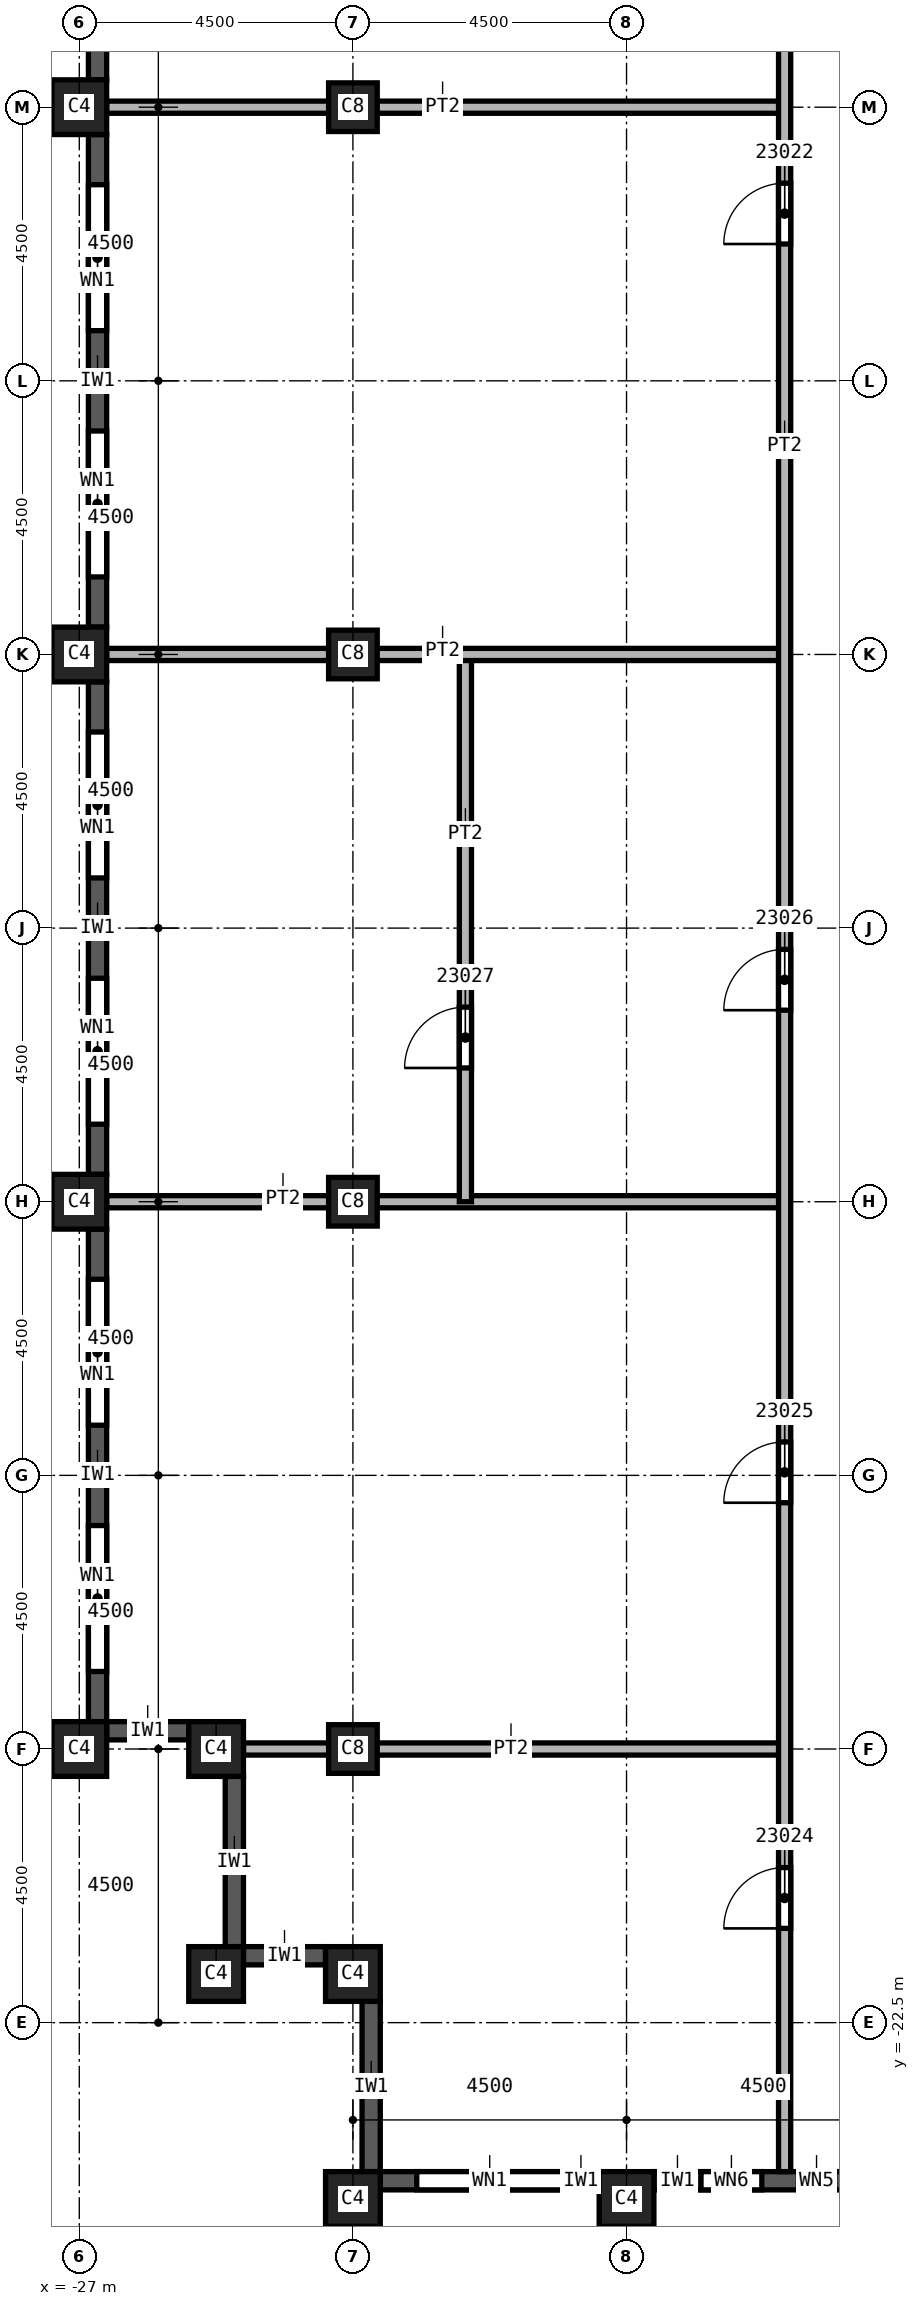
"""IFC4 building model, lengths in metres.
Left out: names, types, materials, properties, quantities, classifications, styles, units other than length and angle.
Written with IfcOpenShell. Run it as: python <this file> out.ifc"""

import sys

from ifc_helpers import new_model, si_unit, direction, frame, frame_2d, origin, origin_2d, place, context, subcontext, project, spatial, rectangle, extrude, element, fill, save


model = new_model("IFC4")
c1 = context("Model", 3, precision=1e-05, world=origin(), true_north=direction((0.0, 1.0)))
c2 = subcontext(c1, "Body", "Model", "MODEL_VIEW")
j1 = project(units=[si_unit("LENGTHUNIT", "METRE"), si_unit("PLANEANGLEUNIT", "RADIAN")], contexts=[c1])
p1 = place(None, origin())
s1 = spatial("IfcSite", under=j1, at=p1, CompositionType="ELEMENT")
p2 = place(p1, origin())
s2 = spatial("IfcBuilding", under=s1, at=p2, CompositionType="ELEMENT")
p3 = place(p2, frame((0.0, 0.0, 326.0)))
s3 = spatial("IfcBuildingStorey", under=s2, at=p3, CompositionType="ELEMENT", Elevation=326.0)
for number, where, z_axis, x_axis in (
    (1, (-22.5, 0.0, 0.0), (0.0, 0.0, 1.0), (1.0, 0.0, 0.0)),
    (2, (-22.5, 9.0, 0.0), (0.0, 0.0, 1.0), (1.0, 0.0, 0.0)),
    (3, (-22.5, -9.0, 0.0), (0.0, 0.0, 1.0), (1.0, 0.0, 0.0)),
    (4, (-22.5, -18.0, 0.0), (0.0, 0.0, 1.0), (1.0, 0.0, 0.0)),
):
    element("IfcColumn", number, at=place(p3, frame(where, z_axis=z_axis, x_axis=x_axis)), inside=s3, PredefinedType="COLUMN", context=c2, shape_type="SweptSolid", body=[
        extrude(rectangle(XDim=0.8, YDim=0.8, at=origin_2d()), origin(), (0.0, 0.0, 1.0), 3.74),
    ])
for number, where, z_axis, x_axis in (
    (5, (-18.0, -25.4, 0.0), (0.0, 0.0, 1.0), (1.0, 0.0, 0.0)),
    (6, (-22.5, -25.4, 0.0), (0.0, 0.0, 1.0), (1.0, 0.0, 0.0)),
    (7, (-27.0, 0.0, 0.0), (0.0, 0.0, 1.0), (0.0, 1.0, 0.0)),
    (8, (-27.0, 9.0, 0.0), (0.0, 0.0, 1.0), (0.0, 1.0, 0.0)),
    (9, (-27.0, -9.0, 0.0), (0.0, 0.0, 1.0), (0.0, 1.0, 0.0)),
    (10, (-27.0, -18.0, 0.0), (0.0, 0.0, 1.0), (0.0, 1.0, 0.0)),
    (11, (-22.5, -21.7, 0.0), (0.0, 0.0, 1.0), (1.0, 0.0, 0.0)),
    (12, (-24.75, -21.7, 0.0), (0.0, 0.0, 1.0), (1.0, 0.0, 0.0)),
    (13, (-24.75, -18.0, 0.0), (0.0, 0.0, 1.0), (1.0, 0.0, 0.0)),
):
    element("IfcColumn", number, at=place(p3, frame(where, z_axis=z_axis, x_axis=x_axis)), inside=s3, PredefinedType="COLUMN", context=c2, shape_type="SweptSolid", body=[
        extrude(rectangle(XDim=0.9, YDim=0.9, at=origin_2d()), origin(), (0.0, 0.0, 1.0), 3.74),
    ])
p4 = place(p3, frame((-26.7, 17.55, 0.0), z_axis=(0.0, 0.0, 1.0), x_axis=(0.0, -1.0, 0.0)))
e14 = element("IfcWall", 14, at=p4, inside=s3, PredefinedType="SOLIDWALL", context=c2, shape_type="SweptSolid", body=[
    extrude(rectangle(XDim=8.1, YDim=0.3, at=frame_2d((4.05, 0.0))), origin(), (0.0, 0.0, 1.0), 3.14),
])
p5 = place(p4, frame((0.825, 0.0, 0.8)))
e15 = element("IfcOpeningElement", 15, at=p5, cuts=e14, PredefinedType="OPENING", context=c2, shape_type="SweptSolid", body=[
    extrude(rectangle(XDim=2.4, YDim=1.95, at=frame_2d((1.2, 0.975))), frame((0.0, 0.15, 0.0), z_axis=(0.0, -1.0, 0.0), x_axis=(1.0, 0.0, 0.0)), (0.0, 0.0, 1.0), 0.3),
])
p6 = place(p4, frame((4.875, 0.0, 0.8)))
e16 = element("IfcOpeningElement", 16, at=p6, cuts=e14, PredefinedType="OPENING", context=c2, shape_type="SweptSolid", body=[
    extrude(rectangle(XDim=2.4, YDim=1.95, at=frame_2d((1.2, 0.975))), frame((0.0, 0.15, 0.0), z_axis=(0.0, -1.0, 0.0), x_axis=(1.0, 0.0, 0.0)), (0.0, 0.0, 1.0), 0.3),
])
p7 = place(p3, frame((-26.7, 8.55, 0.0), z_axis=(0.0, 0.0, 1.0), x_axis=(0.0, -1.0, 0.0)))
e17 = element("IfcWall", 17, at=p7, inside=s3, PredefinedType="SOLIDWALL", context=c2, shape_type="SweptSolid", body=[
    extrude(rectangle(XDim=8.1, YDim=0.3, at=frame_2d((4.05, 0.0))), origin(), (0.0, 0.0, 1.0), 3.14),
])
p8 = place(p7, frame((0.825, 0.0, 0.8)))
e18 = element("IfcOpeningElement", 18, at=p8, cuts=e17, PredefinedType="OPENING", context=c2, shape_type="SweptSolid", body=[
    extrude(rectangle(XDim=2.4, YDim=1.95, at=frame_2d((1.2, 0.975))), frame((0.0, 0.15, 0.0), z_axis=(0.0, -1.0, 0.0), x_axis=(1.0, 0.0, 0.0)), (0.0, 0.0, 1.0), 0.3),
])
p9 = place(p7, frame((4.875, 0.0, 0.8)))
e19 = element("IfcOpeningElement", 19, at=p9, cuts=e17, PredefinedType="OPENING", context=c2, shape_type="SweptSolid", body=[
    extrude(rectangle(XDim=2.4, YDim=1.95, at=frame_2d((1.2, 0.975))), frame((0.0, 0.15, 0.0), z_axis=(0.0, -1.0, 0.0), x_axis=(1.0, 0.0, 0.0)), (0.0, 0.0, 1.0), 0.3),
])
p10 = place(p3, frame((-26.7, -0.45, 0.0), z_axis=(0.0, 0.0, 1.0), x_axis=(0.0, -1.0, 0.0)))
e20 = element("IfcWall", 20, at=p10, inside=s3, PredefinedType="SOLIDWALL", context=c2, shape_type="SweptSolid", body=[
    extrude(rectangle(XDim=8.1, YDim=0.3, at=frame_2d((4.05, 0.0))), origin(), (0.0, 0.0, 1.0), 3.14),
])
p11 = place(p10, frame((0.825, 0.0, 0.8)))
e21 = element("IfcOpeningElement", 21, at=p11, cuts=e20, PredefinedType="OPENING", context=c2, shape_type="SweptSolid", body=[
    extrude(rectangle(XDim=2.4, YDim=1.95, at=frame_2d((1.2, 0.975))), frame((0.0, 0.15, 0.0), z_axis=(0.0, -1.0, 0.0), x_axis=(1.0, 0.0, 0.0)), (0.0, 0.0, 1.0), 0.3),
])
p12 = place(p10, frame((4.875, 0.0, 0.8)))
e22 = element("IfcOpeningElement", 22, at=p12, cuts=e20, PredefinedType="OPENING", context=c2, shape_type="SweptSolid", body=[
    extrude(rectangle(XDim=2.4, YDim=1.95, at=frame_2d((1.2, 0.975))), frame((0.0, 0.15, 0.0), z_axis=(0.0, -1.0, 0.0), x_axis=(1.0, 0.0, 0.0)), (0.0, 0.0, 1.0), 0.3),
])
p13 = place(p3, frame((-26.7, -9.45, 0.0), z_axis=(0.0, 0.0, 1.0), x_axis=(0.0, -1.0, 0.0)))
e23 = element("IfcWall", 23, at=p13, inside=s3, PredefinedType="SOLIDWALL", context=c2, shape_type="SweptSolid", body=[
    extrude(rectangle(XDim=8.1, YDim=0.3, at=frame_2d((4.05, 0.0))), origin(), (0.0, 0.0, 1.0), 3.14),
])
p14 = place(p13, frame((0.825, 0.0, 0.8)))
e24 = element("IfcOpeningElement", 24, at=p14, cuts=e23, PredefinedType="OPENING", context=c2, shape_type="SweptSolid", body=[
    extrude(rectangle(XDim=2.4, YDim=1.95, at=frame_2d((1.2, 0.975))), frame((0.0, 0.15, 0.0), z_axis=(0.0, -1.0, 0.0), x_axis=(1.0, 0.0, 0.0)), (0.0, 0.0, 1.0), 0.3),
])
p15 = place(p13, frame((4.875, 0.0, 0.8)))
e25 = element("IfcOpeningElement", 25, at=p15, cuts=e23, PredefinedType="OPENING", context=c2, shape_type="SweptSolid", body=[
    extrude(rectangle(XDim=2.4, YDim=1.95, at=frame_2d((1.2, 0.975))), frame((0.0, 0.15, 0.0), z_axis=(0.0, -1.0, 0.0), x_axis=(1.0, 0.0, 0.0)), (0.0, 0.0, 1.0), 0.3),
])
p16 = place(p3, frame((-26.55, -17.7, 0.0), z_axis=(0.0, 0.0, 1.0), x_axis=(1.0, 0.0, 0.0)))
e26 = element("IfcWall", 26, at=p16, inside=s3, PredefinedType="SOLIDWALL", context=c2, shape_type="SweptSolid", body=[
    extrude(rectangle(XDim=1.35, YDim=0.3, at=frame_2d((0.675, 0.0))), origin(), (0.0, 0.0, 1.0), 3.14),
])
p17 = place(p3, frame((-24.45, -18.45, 0.0), z_axis=(0.0, 0.0, 1.0), x_axis=(0.0, -1.0, 0.0)))
e27 = element("IfcWall", 27, at=p17, inside=s3, PredefinedType="SOLIDWALL", context=c2, shape_type="SweptSolid", body=[
    extrude(rectangle(XDim=2.8, YDim=0.3, at=frame_2d((1.4, 0.0))), origin(), (0.0, 0.0, 1.0), 3.14),
])
p18 = place(p3, frame((-24.3, -21.4, 0.0), z_axis=(0.0, 0.0, 1.0), x_axis=(1.0, 0.0, 0.0)))
e28 = element("IfcWall", 28, at=p18, inside=s3, PredefinedType="SOLIDWALL", context=c2, shape_type="SweptSolid", body=[
    extrude(rectangle(XDim=1.35, YDim=0.3, at=frame_2d((0.675, 0.0))), origin(), (0.0, 0.0, 1.0), 3.14),
])
p19 = place(p3, frame((-22.2, -22.15, 0.0), z_axis=(0.0, 0.0, 1.0), x_axis=(0.0, -1.0, 0.0)))
e29 = element("IfcWall", 29, at=p19, inside=s3, PredefinedType="SOLIDWALL", context=c2, shape_type="SweptSolid", body=[
    extrude(rectangle(XDim=2.8, YDim=0.3, at=frame_2d((1.4, 0.0))), origin(), (0.0, 0.0, 1.0), 3.14),
])
p20 = place(p3, frame((-22.05, -25.1, 0.0), z_axis=(0.0, 0.0, 1.0), x_axis=(1.0, 0.0, 0.0)))
e30 = element("IfcWall", 30, at=p20, inside=s3, PredefinedType="SOLIDWALL", context=c2, shape_type="SweptSolid", body=[
    extrude(rectangle(XDim=3.6, YDim=0.3, at=frame_2d((1.8, 0.0))), origin(), (0.0, 0.0, 1.0), 3.14),
])
p21 = place(p20, frame((0.6, 0.0, 0.8)))
e31 = element("IfcOpeningElement", 31, at=p21, cuts=e30, PredefinedType="OPENING", context=c2, shape_type="SweptSolid", body=[
    extrude(rectangle(XDim=2.4, YDim=1.95, at=frame_2d((1.2, 0.975))), frame((0.0, 0.15, 0.0), z_axis=(0.0, -1.0, 0.0), x_axis=(1.0, 0.0, 0.0)), (0.0, 0.0, 1.0), 0.3),
])
p22 = place(p3, frame((-17.55, -25.1, 0.0), z_axis=(0.0, 0.0, 1.0), x_axis=(1.0, 0.0, 0.0)))
e32 = element("IfcWall", 32, at=p22, inside=s3, PredefinedType="SOLIDWALL", context=c2, shape_type="SweptSolid", body=[
    extrude(rectangle(XDim=3.6, YDim=0.3, at=frame_2d((1.8, 0.0))), origin(), (0.0, 0.0, 1.0), 3.14),
])
p23 = place(p22, frame((0.775, 0.0, 0.8)))
e33 = element("IfcOpeningElement", 33, at=p23, cuts=e32, PredefinedType="OPENING", context=c2, shape_type="SweptSolid", body=[
    extrude(rectangle(XDim=1.0, YDim=1.95, at=frame_2d((0.5, 0.975))), frame((0.0, 0.15, 0.0), z_axis=(0.0, -1.0, 0.0), x_axis=(1.0, 0.0, 0.0)), (0.0, 0.0, 1.0), 0.3),
])
p24 = place(p22, frame((2.375, 0.0, 0.8)))
e34 = element("IfcOpeningElement", 34, at=p24, cuts=e32, PredefinedType="OPENING", context=c2, shape_type="SweptSolid", body=[
    extrude(rectangle(XDim=0.6, YDim=1.95, at=frame_2d((0.3, 0.975))), frame((0.0, 0.15, 0.0), z_axis=(0.0, -1.0, 0.0), x_axis=(1.0, 0.0, 0.0)), (0.0, 0.0, 1.0), 0.3),
])
for number, where, z_axis, x_axis in (
    (35, (-26.55, -9.0, 0.0), (0.0, 0.0, 1.0), (1.0, 0.0, 0.0)),
    (36, (-26.55, 9.0, 0.0), (0.0, 0.0, 1.0), (1.0, 0.0, 0.0)),
):
    element("IfcWall", number, at=place(p3, frame(where, z_axis=z_axis, x_axis=x_axis)), inside=s3, PredefinedType="PARTITIONING", context=c2, shape_type="SweptSolid", body=[
        extrude(rectangle(XDim=11.15, YDim=0.2, at=frame_2d((5.575, 0.0))), origin(), (0.0, 0.0, 1.0), 3.74),
    ])
p25 = place(p3, frame((-24.3, -18.0, 0.0), z_axis=(0.0, 0.0, 1.0), x_axis=(1.0, 0.0, 0.0)))
e37 = element("IfcWall", 37, at=p25, inside=s3, PredefinedType="PARTITIONING", context=c2, shape_type="SweptSolid", body=[
    extrude(rectangle(XDim=8.9, YDim=0.2, at=frame_2d((4.45, 0.0))), origin(), (0.0, 0.0, 1.0), 3.74),
])
p26 = place(p3, frame((-20.65, -9.0, 0.0), z_axis=(0.0, 0.0, 1.0), x_axis=(0.0, 1.0, 0.0)))
e38 = element("IfcWall", 38, at=p26, inside=s3, PredefinedType="PARTITIONING", context=c2, shape_type="SweptSolid", body=[
    extrude(rectangle(XDim=9.0, YDim=0.2, at=frame_2d((4.5, 0.0))), origin(), (0.0, 0.0, 1.0), 3.74),
])
p27 = place(p26, frame((2.2, 0.0, 0.0)))
e39 = element("IfcOpeningElement", 39, at=p27, cuts=e38, PredefinedType="OPENING", context=c2, shape_type="SweptSolid", body=[
    extrude(rectangle(XDim=1.0, YDim=2.1, at=frame_2d((0.5, 1.05))), frame((0.0, 0.1, 0.0), z_axis=(0.0, -1.0, 0.0), x_axis=(1.0, 0.0, 0.0)), (0.0, 0.0, 1.0), 0.2),
])
p28 = place(p3, frame((-15.4, 0.0, 0.0), z_axis=(0.0, 0.0, 1.0), x_axis=(-1.0, 0.0, 0.0)))
e40 = element("IfcWall", 40, at=p28, inside=s3, PredefinedType="PARTITIONING", context=c2, shape_type="SweptSolid", body=[
    extrude(rectangle(XDim=11.15, YDim=0.2, at=frame_2d((5.575, 0.0))), origin(), (0.0, 0.0, 1.0), 3.74),
])
p29 = place(p3, frame((-15.4, -24.95, 0.0), z_axis=(0.0, 0.0, 1.0), x_axis=(0.0, 1.0, 0.0)))
e41 = element("IfcWall", 41, at=p29, inside=s3, PredefinedType="PARTITIONING", context=c2, shape_type="SweptSolid", body=[
    extrude(rectangle(XDim=38.55, YDim=0.2, at=frame_2d((19.275, 0.0))), origin(), (0.0, 0.0, 1.0), 3.74),
])
p30 = place(p29, frame((31.7, 0.0, 0.0)))
e42 = element("IfcOpeningElement", 42, at=p30, cuts=e41, PredefinedType="OPENING", context=c2, shape_type="SweptSolid", body=[
    extrude(rectangle(XDim=1.0, YDim=2.1, at=frame_2d((0.5, 1.05))), frame((0.0, 0.1, 0.0), z_axis=(0.0, -1.0, 0.0), x_axis=(1.0, 0.0, 0.0)), (0.0, 0.0, 1.0), 0.2),
])
p31 = place(p29, frame((4.0, 0.0, 0.0)))
e43 = element("IfcOpeningElement", 43, at=p31, cuts=e41, PredefinedType="OPENING", context=c2, shape_type="SweptSolid", body=[
    extrude(rectangle(XDim=1.0, YDim=2.1, at=frame_2d((0.5, 1.05))), frame((0.0, 0.1, 0.0), z_axis=(0.0, -1.0, 0.0), x_axis=(1.0, 0.0, 0.0)), (0.0, 0.0, 1.0), 0.2),
])
p32 = place(p29, frame((11.0, 0.0, 0.0)))
e44 = element("IfcOpeningElement", 44, at=p32, cuts=e41, PredefinedType="OPENING", context=c2, shape_type="SweptSolid", body=[
    extrude(rectangle(XDim=1.0, YDim=2.1, at=frame_2d((0.5, 1.05))), frame((0.0, 0.1, 0.0), z_axis=(0.0, -1.0, 0.0), x_axis=(1.0, 0.0, 0.0)), (0.0, 0.0, 1.0), 0.2),
])
p33 = place(p29, frame((19.1, 0.0, 0.0)))
e45 = element("IfcOpeningElement", 45, at=p33, cuts=e41, PredefinedType="OPENING", context=c2, shape_type="SweptSolid", body=[
    extrude(rectangle(XDim=1.0, YDim=2.1, at=frame_2d((0.5, 1.05))), frame((0.0, 0.1, 0.0), z_axis=(0.0, -1.0, 0.0), x_axis=(1.0, 0.0, 0.0)), (0.0, 0.0, 1.0), 0.2),
])
p34 = place(p8, origin())
e46 = element("IfcWindow", 46, at=p34, inside=s3, PartitioningType="SINGLE_PANEL", PredefinedType="WINDOW", context=c2, shape_type="SweptSolid", body=[
    extrude(rectangle(XDim=2.4, YDim=1.95, at=frame_2d((1.2, 0.975))), frame((0.0, 0.03, 0.0), z_axis=(0.0, -1.0, 0.0), x_axis=(1.0, 0.0, 0.0)), (0.0, 0.0, 1.0), 0.06),
])
fill(e18, e46)
p35 = place(p9, origin())
e47 = element("IfcWindow", 47, at=p35, inside=s3, PartitioningType="SINGLE_PANEL", PredefinedType="WINDOW", context=c2, shape_type="SweptSolid", body=[
    extrude(rectangle(XDim=2.4, YDim=1.95, at=frame_2d((1.2, 0.975))), frame((0.0, 0.03, 0.0), z_axis=(0.0, -1.0, 0.0), x_axis=(1.0, 0.0, 0.0)), (0.0, 0.0, 1.0), 0.06),
])
fill(e19, e47)
p36 = place(p11, origin())
e48 = element("IfcWindow", 48, at=p36, inside=s3, PartitioningType="SINGLE_PANEL", PredefinedType="WINDOW", context=c2, shape_type="SweptSolid", body=[
    extrude(rectangle(XDim=2.4, YDim=1.95, at=frame_2d((1.2, 0.975))), frame((0.0, 0.03, 0.0), z_axis=(0.0, -1.0, 0.0), x_axis=(1.0, 0.0, 0.0)), (0.0, 0.0, 1.0), 0.06),
])
fill(e21, e48)
p37 = place(p12, origin())
e49 = element("IfcWindow", 49, at=p37, inside=s3, PartitioningType="SINGLE_PANEL", PredefinedType="WINDOW", context=c2, shape_type="SweptSolid", body=[
    extrude(rectangle(XDim=2.4, YDim=1.95, at=frame_2d((1.2, 0.975))), frame((0.0, 0.03, 0.0), z_axis=(0.0, -1.0, 0.0), x_axis=(1.0, 0.0, 0.0)), (0.0, 0.0, 1.0), 0.06),
])
fill(e22, e49)
p38 = place(p14, origin())
e50 = element("IfcWindow", 50, at=p38, inside=s3, PartitioningType="SINGLE_PANEL", PredefinedType="WINDOW", context=c2, shape_type="SweptSolid", body=[
    extrude(rectangle(XDim=2.4, YDim=1.95, at=frame_2d((1.2, 0.975))), frame((0.0, 0.03, 0.0), z_axis=(0.0, -1.0, 0.0), x_axis=(1.0, 0.0, 0.0)), (0.0, 0.0, 1.0), 0.06),
])
fill(e24, e50)
p39 = place(p15, origin())
e51 = element("IfcWindow", 51, at=p39, inside=s3, PartitioningType="SINGLE_PANEL", PredefinedType="WINDOW", context=c2, shape_type="SweptSolid", body=[
    extrude(rectangle(XDim=2.4, YDim=1.95, at=frame_2d((1.2, 0.975))), frame((0.0, 0.03, 0.0), z_axis=(0.0, -1.0, 0.0), x_axis=(1.0, 0.0, 0.0)), (0.0, 0.0, 1.0), 0.06),
])
fill(e25, e51)
p40 = place(p21, origin())
e52 = element("IfcWindow", 52, at=p40, inside=s3, PartitioningType="SINGLE_PANEL", PredefinedType="WINDOW", context=c2, shape_type="SweptSolid", body=[
    extrude(rectangle(XDim=2.4, YDim=1.95, at=frame_2d((1.2, 0.975))), frame((0.0, 0.03, 0.0), z_axis=(0.0, -1.0, 0.0), x_axis=(1.0, 0.0, 0.0)), (0.0, 0.0, 1.0), 0.06),
])
fill(e31, e52)
p41 = place(p30, origin())
e53 = element("IfcDoor", 53, at=p41, inside=s3, OperationType="SINGLE_SWING_LEFT", PredefinedType="DOOR", context=c2, shape_type="SweptSolid", body=[
    extrude(rectangle(XDim=1.0, YDim=2.1, at=frame_2d((0.5, 1.05))), frame((0.0, 0.025, 0.0), z_axis=(0.0, -1.0, 0.0), x_axis=(1.0, 0.0, 0.0)), (0.0, 0.0, 1.0), 0.05),
])
fill(e42, e53)
p42 = place(p31, origin())
e54 = element("IfcDoor", 54, at=p42, inside=s3, OperationType="SINGLE_SWING_LEFT", PredefinedType="DOOR", context=c2, shape_type="SweptSolid", body=[
    extrude(rectangle(XDim=1.0, YDim=2.1, at=frame_2d((0.5, 1.05))), frame((0.0, 0.025, 0.0), z_axis=(0.0, -1.0, 0.0), x_axis=(1.0, 0.0, 0.0)), (0.0, 0.0, 1.0), 0.05),
])
fill(e43, e54)
p43 = place(p32, origin())
e55 = element("IfcDoor", 55, at=p43, inside=s3, OperationType="SINGLE_SWING_RIGHT", PredefinedType="DOOR", context=c2, shape_type="SweptSolid", body=[
    extrude(rectangle(XDim=1.0, YDim=2.1, at=frame_2d((0.5, 1.05))), frame((0.0, 0.025, 0.0), z_axis=(0.0, -1.0, 0.0), x_axis=(1.0, 0.0, 0.0)), (0.0, 0.0, 1.0), 0.05),
])
fill(e44, e55)
p44 = place(p33, origin())
e56 = element("IfcDoor", 56, at=p44, inside=s3, OperationType="SINGLE_SWING_LEFT", PredefinedType="DOOR", context=c2, shape_type="SweptSolid", body=[
    extrude(rectangle(XDim=1.0, YDim=2.1, at=frame_2d((0.5, 1.05))), frame((0.0, 0.025, 0.0), z_axis=(0.0, -1.0, 0.0), x_axis=(1.0, 0.0, 0.0)), (0.0, 0.0, 1.0), 0.05),
])
fill(e45, e56)
p45 = place(p27, origin())
e57 = element("IfcDoor", 57, at=p45, inside=s3, OperationType="SINGLE_SWING_RIGHT", PredefinedType="DOOR", context=c2, shape_type="SweptSolid", body=[
    extrude(rectangle(XDim=1.0, YDim=2.1, at=frame_2d((0.5, 1.05))), frame((0.0, 0.025, 0.0), z_axis=(0.0, -1.0, 0.0), x_axis=(1.0, 0.0, 0.0)), (0.0, 0.0, 1.0), 0.05),
])
fill(e39, e57)
p46 = place(p23, origin())
e58 = element("IfcWindow", 58, at=p46, inside=s3, PartitioningType="SINGLE_PANEL", PredefinedType="WINDOW", context=c2, shape_type="SweptSolid", body=[
    extrude(rectangle(XDim=1.0, YDim=1.95, at=frame_2d((0.5, 0.975))), frame((0.0, 0.03, 0.0), z_axis=(0.0, -1.0, 0.0), x_axis=(1.0, 0.0, 0.0)), (0.0, 0.0, 1.0), 0.06),
])
fill(e33, e58)
p47 = place(p24, origin())
e59 = element("IfcWindow", 59, at=p47, inside=s3, PartitioningType="SINGLE_PANEL", PredefinedType="WINDOW", context=c2, shape_type="SweptSolid", body=[
    extrude(rectangle(XDim=0.6, YDim=1.95, at=frame_2d((0.3, 0.975))), frame((0.0, 0.03, 0.0), z_axis=(0.0, -1.0, 0.0), x_axis=(1.0, 0.0, 0.0)), (0.0, 0.0, 1.0), 0.06),
])
fill(e34, e59)
save(model, sys.argv[1])
